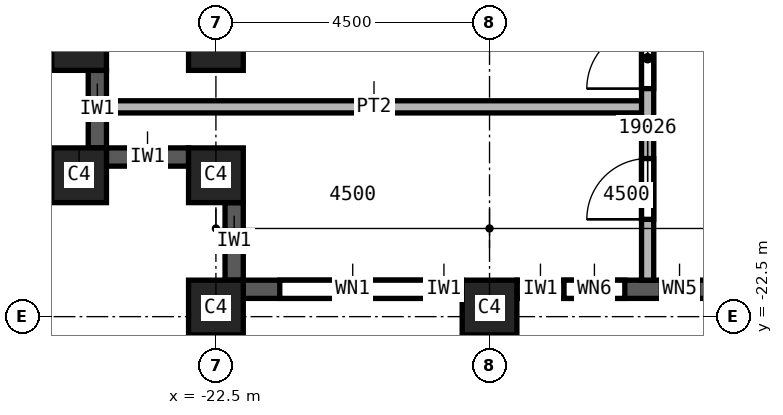
"""IFC4 building model, lengths in metres.
Left out: names, types, materials, properties, quantities, classifications, styles, units other than length and angle.
Written with IfcOpenShell. Run it as: python <this file> out.ifc"""

import sys

from ifc_helpers import new_model, si_unit, direction, frame, frame_2d, origin, origin_2d, place, context, subcontext, project, spatial, rectangle, extrude, element, fill, save


model = new_model("IFC4")
c1 = context("Model", 3, precision=1e-05, world=origin(), true_north=direction((0.0, 1.0)))
c2 = subcontext(c1, "Body", "Model", "MODEL_VIEW")
j1 = project(units=[si_unit("LENGTHUNIT", "METRE"), si_unit("PLANEANGLEUNIT", "RADIAN")], contexts=[c1])
p1 = place(None, origin())
s1 = spatial("IfcSite", under=j1, at=p1, CompositionType="ELEMENT")
p2 = place(p1, origin())
s2 = spatial("IfcBuilding", under=s1, at=p2, CompositionType="ELEMENT")
p3 = place(p2, frame((0.0, 0.0, 278.0)))
s3 = spatial("IfcBuildingStorey", under=s2, at=p3, CompositionType="ELEMENT", Elevation=278.0)
for number, where, z_axis, x_axis in (
    (1, (-22.5, -18.0, 0.0), (0.0, 0.0, 1.0), (1.0, 0.0, 0.0)),
    (2, (-18.0, -22.35, 0.0), (0.0, 0.0, 1.0), (1.0, 0.0, 0.0)),
    (3, (-22.5, -22.35, 0.0), (0.0, 0.0, 1.0), (1.0, 0.0, 0.0)),
    (4, (-22.5, -20.175, 0.0), (0.0, 0.0, 1.0), (1.0, 0.0, 0.0)),
    (5, (-24.75, -20.175, 0.0), (0.0, 0.0, 1.0), (1.0, 0.0, 0.0)),
    (6, (-24.75, -18.0, 0.0), (0.0, 0.0, 1.0), (1.0, 0.0, 0.0)),
):
    element("IfcColumn", number, at=place(p3, frame(where, z_axis=z_axis, x_axis=x_axis)), inside=s3, PredefinedType="COLUMN", context=c2, shape_type="SweptSolid", body=[
        extrude(rectangle(XDim=0.9, YDim=0.9, at=origin_2d()), origin(), (0.0, 0.0, 1.0), 3.72),
    ])
p4 = place(p3, frame((-24.45, -18.45, 0.0), z_axis=(0.0, 0.0, 1.0), x_axis=(0.0, -1.0, 0.0)))
e7 = element("IfcWall", 7, at=p4, inside=s3, PredefinedType="SOLIDWALL", context=c2, shape_type="SweptSolid", body=[
    extrude(rectangle(XDim=1.275, YDim=0.3, at=frame_2d((0.638, 0.0))), origin(), (0.0, 0.0, 1.0), 3.12),
])
p5 = place(p3, frame((-24.3, -19.875, 0.0), z_axis=(0.0, 0.0, 1.0), x_axis=(1.0, 0.0, 0.0)))
e8 = element("IfcWall", 8, at=p5, inside=s3, PredefinedType="SOLIDWALL", context=c2, shape_type="SweptSolid", body=[
    extrude(rectangle(XDim=1.35, YDim=0.3, at=frame_2d((0.675, 0.0))), origin(), (0.0, 0.0, 1.0), 3.12),
])
p6 = place(p3, frame((-22.2, -20.625, 0.0), z_axis=(0.0, 0.0, 1.0), x_axis=(0.0, -1.0, 0.0)))
e9 = element("IfcWall", 9, at=p6, inside=s3, PredefinedType="SOLIDWALL", context=c2, shape_type="SweptSolid", body=[
    extrude(rectangle(XDim=1.275, YDim=0.3, at=frame_2d((0.637, 0.0))), origin(), (0.0, 0.0, 1.0), 3.12),
])
p7 = place(p3, frame((-22.05, -22.05, 0.0), z_axis=(0.0, 0.0, 1.0), x_axis=(1.0, 0.0, 0.0)))
e10 = element("IfcWall", 10, at=p7, inside=s3, PredefinedType="SOLIDWALL", context=c2, shape_type="SweptSolid", body=[
    extrude(rectangle(XDim=3.6, YDim=0.3, at=frame_2d((1.8, 0.0))), origin(), (0.0, 0.0, 1.0), 3.12),
])
p8 = place(p7, frame((0.6, 0.0, 0.8)))
e11 = element("IfcOpeningElement", 11, at=p8, cuts=e10, PredefinedType="OPENING", context=c2, shape_type="SweptSolid", body=[
    extrude(rectangle(XDim=2.4, YDim=1.95, at=frame_2d((1.2, 0.975))), frame((0.0, 0.15, 0.0), z_axis=(0.0, -1.0, 0.0), x_axis=(1.0, 0.0, 0.0)), (0.0, 0.0, 1.0), 0.3),
])
p9 = place(p3, frame((-17.55, -22.05, 0.0), z_axis=(0.0, 0.0, 1.0), x_axis=(1.0, 0.0, 0.0)))
e12 = element("IfcWall", 12, at=p9, inside=s3, PredefinedType="SOLIDWALL", context=c2, shape_type="SweptSolid", body=[
    extrude(rectangle(XDim=3.6, YDim=0.3, at=frame_2d((1.8, 0.0))), origin(), (0.0, 0.0, 1.0), 3.12),
])
p10 = place(p9, frame((0.775, 0.0, 0.8)))
e13 = element("IfcOpeningElement", 13, at=p10, cuts=e12, PredefinedType="OPENING", context=c2, shape_type="SweptSolid", body=[
    extrude(rectangle(XDim=1.0, YDim=1.95, at=frame_2d((0.5, 0.975))), frame((0.0, 0.15, 0.0), z_axis=(0.0, -1.0, 0.0), x_axis=(1.0, 0.0, 0.0)), (0.0, 0.0, 1.0), 0.3),
])
p11 = place(p9, frame((2.375, 0.0, 0.8)))
e14 = element("IfcOpeningElement", 14, at=p11, cuts=e12, PredefinedType="OPENING", context=c2, shape_type="SweptSolid", body=[
    extrude(rectangle(XDim=0.6, YDim=1.95, at=frame_2d((0.3, 0.975))), frame((0.0, 0.15, 0.0), z_axis=(0.0, -1.0, 0.0), x_axis=(1.0, 0.0, 0.0)), (0.0, 0.0, 1.0), 0.3),
])
p12 = place(p3, frame((-24.3, -19.05, 0.0), z_axis=(0.0, 0.0, 1.0), x_axis=(1.0, 0.0, 0.0)))
e15 = element("IfcWall", 15, at=p12, inside=s3, PredefinedType="PARTITIONING", context=c2, shape_type="SweptSolid", body=[
    extrude(rectangle(XDim=8.9, YDim=0.2, at=frame_2d((4.45, 0.0))), origin(), (0.0, 0.0, 1.0), 3.72),
])
p13 = place(p3, frame((-15.4, -21.9, 0.0), z_axis=(0.0, 0.0, 1.0), x_axis=(0.0, 1.0, 0.0)))
e16 = element("IfcWall", 16, at=p13, inside=s3, PredefinedType="PARTITIONING", context=c2, shape_type="SweptSolid", body=[
    extrude(rectangle(XDim=35.5, YDim=0.2, at=frame_2d((17.75, 0.0))), origin(), (0.0, 0.0, 1.0), 3.72),
])
p14 = place(p13, frame((22.05, 0.0, 0.0)))
e17 = element("IfcOpeningElement", 17, at=p14, cuts=e16, PredefinedType="OPENING", context=c2, shape_type="SweptSolid", body=[
    extrude(rectangle(XDim=1.0, YDim=2.1, at=frame_2d((0.5, 1.05))), frame((0.0, 0.1, 0.0), z_axis=(0.0, -1.0, 0.0), x_axis=(1.0, 0.0, 0.0)), (0.0, 0.0, 1.0), 0.2),
])
p15 = place(p13, frame((29.7, 0.0, 0.0)))
e18 = element("IfcOpeningElement", 18, at=p15, cuts=e16, PredefinedType="OPENING", context=c2, shape_type="SweptSolid", body=[
    extrude(rectangle(XDim=1.0, YDim=2.1, at=frame_2d((0.5, 1.05))), frame((0.0, 0.1, 0.0), z_axis=(0.0, -1.0, 0.0), x_axis=(1.0, 0.0, 0.0)), (0.0, 0.0, 1.0), 0.2),
])
p16 = place(p13, frame((1.0, 0.0, 0.0)))
e19 = element("IfcOpeningElement", 19, at=p16, cuts=e16, PredefinedType="OPENING", context=c2, shape_type="SweptSolid", body=[
    extrude(rectangle(XDim=1.0, YDim=2.1, at=frame_2d((0.5, 1.05))), frame((0.0, 0.1, 0.0), z_axis=(0.0, -1.0, 0.0), x_axis=(1.0, 0.0, 0.0)), (0.0, 0.0, 1.0), 0.2),
])
p17 = place(p13, frame((3.15, 0.0, 0.0)))
e20 = element("IfcOpeningElement", 20, at=p17, cuts=e16, PredefinedType="OPENING", context=c2, shape_type="SweptSolid", body=[
    extrude(rectangle(XDim=1.0, YDim=2.1, at=frame_2d((0.5, 1.05))), frame((0.0, 0.1, 0.0), z_axis=(0.0, -1.0, 0.0), x_axis=(1.0, 0.0, 0.0)), (0.0, 0.0, 1.0), 0.2),
])
p18 = place(p13, frame((8.4, 0.0, 0.0)))
e21 = element("IfcOpeningElement", 21, at=p18, cuts=e16, PredefinedType="OPENING", context=c2, shape_type="SweptSolid", body=[
    extrude(rectangle(XDim=1.0, YDim=2.1, at=frame_2d((0.5, 1.05))), frame((0.0, 0.1, 0.0), z_axis=(0.0, -1.0, 0.0), x_axis=(1.0, 0.0, 0.0)), (0.0, 0.0, 1.0), 0.2),
])
p19 = place(p13, frame((17.25, 0.0, 0.0)))
e22 = element("IfcOpeningElement", 22, at=p19, cuts=e16, PredefinedType="OPENING", context=c2, shape_type="SweptSolid", body=[
    extrude(rectangle(XDim=1.0, YDim=2.1, at=frame_2d((0.5, 1.05))), frame((0.0, 0.1, 0.0), z_axis=(0.0, -1.0, 0.0), x_axis=(1.0, 0.0, 0.0)), (0.0, 0.0, 1.0), 0.2),
])
p20 = place(p13, frame((20.625, 0.0, 0.0)))
e23 = element("IfcOpeningElement", 23, at=p20, cuts=e16, PredefinedType="OPENING", context=c2, shape_type="SweptSolid", body=[
    extrude(rectangle(XDim=1.0, YDim=2.1, at=frame_2d((0.5, 1.05))), frame((0.0, 0.1, 0.0), z_axis=(0.0, -1.0, 0.0), x_axis=(1.0, 0.0, 0.0)), (0.0, 0.0, 1.0), 0.2),
])
p21 = place(p8, origin())
e24 = element("IfcWindow", 24, at=p21, inside=s3, PartitioningType="SINGLE_PANEL", PredefinedType="WINDOW", context=c2, shape_type="SweptSolid", body=[
    extrude(rectangle(XDim=2.4, YDim=1.95, at=frame_2d((1.2, 0.975))), frame((0.0, 0.03, 0.0), z_axis=(0.0, -1.0, 0.0), x_axis=(1.0, 0.0, 0.0)), (0.0, 0.0, 1.0), 0.06),
])
fill(e11, e24)
p22 = place(p16, origin())
e25 = element("IfcDoor", 25, at=p22, inside=s3, OperationType="SINGLE_SWING_LEFT", PredefinedType="DOOR", context=c2, shape_type="SweptSolid", body=[
    extrude(rectangle(XDim=1.0, YDim=2.1, at=frame_2d((0.5, 1.05))), frame((0.0, 0.025, 0.0), z_axis=(0.0, -1.0, 0.0), x_axis=(1.0, 0.0, 0.0)), (0.0, 0.0, 1.0), 0.05),
])
fill(e19, e25)
p23 = place(p17, origin())
e26 = element("IfcDoor", 26, at=p23, inside=s3, OperationType="SINGLE_SWING_RIGHT", PredefinedType="DOOR", context=c2, shape_type="SweptSolid", body=[
    extrude(rectangle(XDim=1.0, YDim=2.1, at=frame_2d((0.5, 1.05))), frame((0.0, 0.025, 0.0), z_axis=(0.0, -1.0, 0.0), x_axis=(1.0, 0.0, 0.0)), (0.0, 0.0, 1.0), 0.05),
])
fill(e20, e26)
p24 = place(p10, origin())
e27 = element("IfcWindow", 27, at=p24, inside=s3, PartitioningType="SINGLE_PANEL", PredefinedType="WINDOW", context=c2, shape_type="SweptSolid", body=[
    extrude(rectangle(XDim=1.0, YDim=1.95, at=frame_2d((0.5, 0.975))), frame((0.0, 0.03, 0.0), z_axis=(0.0, -1.0, 0.0), x_axis=(1.0, 0.0, 0.0)), (0.0, 0.0, 1.0), 0.06),
])
fill(e13, e27)
p25 = place(p11, origin())
e28 = element("IfcWindow", 28, at=p25, inside=s3, PartitioningType="SINGLE_PANEL", PredefinedType="WINDOW", context=c2, shape_type="SweptSolid", body=[
    extrude(rectangle(XDim=0.6, YDim=1.95, at=frame_2d((0.3, 0.975))), frame((0.0, 0.03, 0.0), z_axis=(0.0, -1.0, 0.0), x_axis=(1.0, 0.0, 0.0)), (0.0, 0.0, 1.0), 0.06),
])
fill(e14, e28)
save(model, sys.argv[1])
